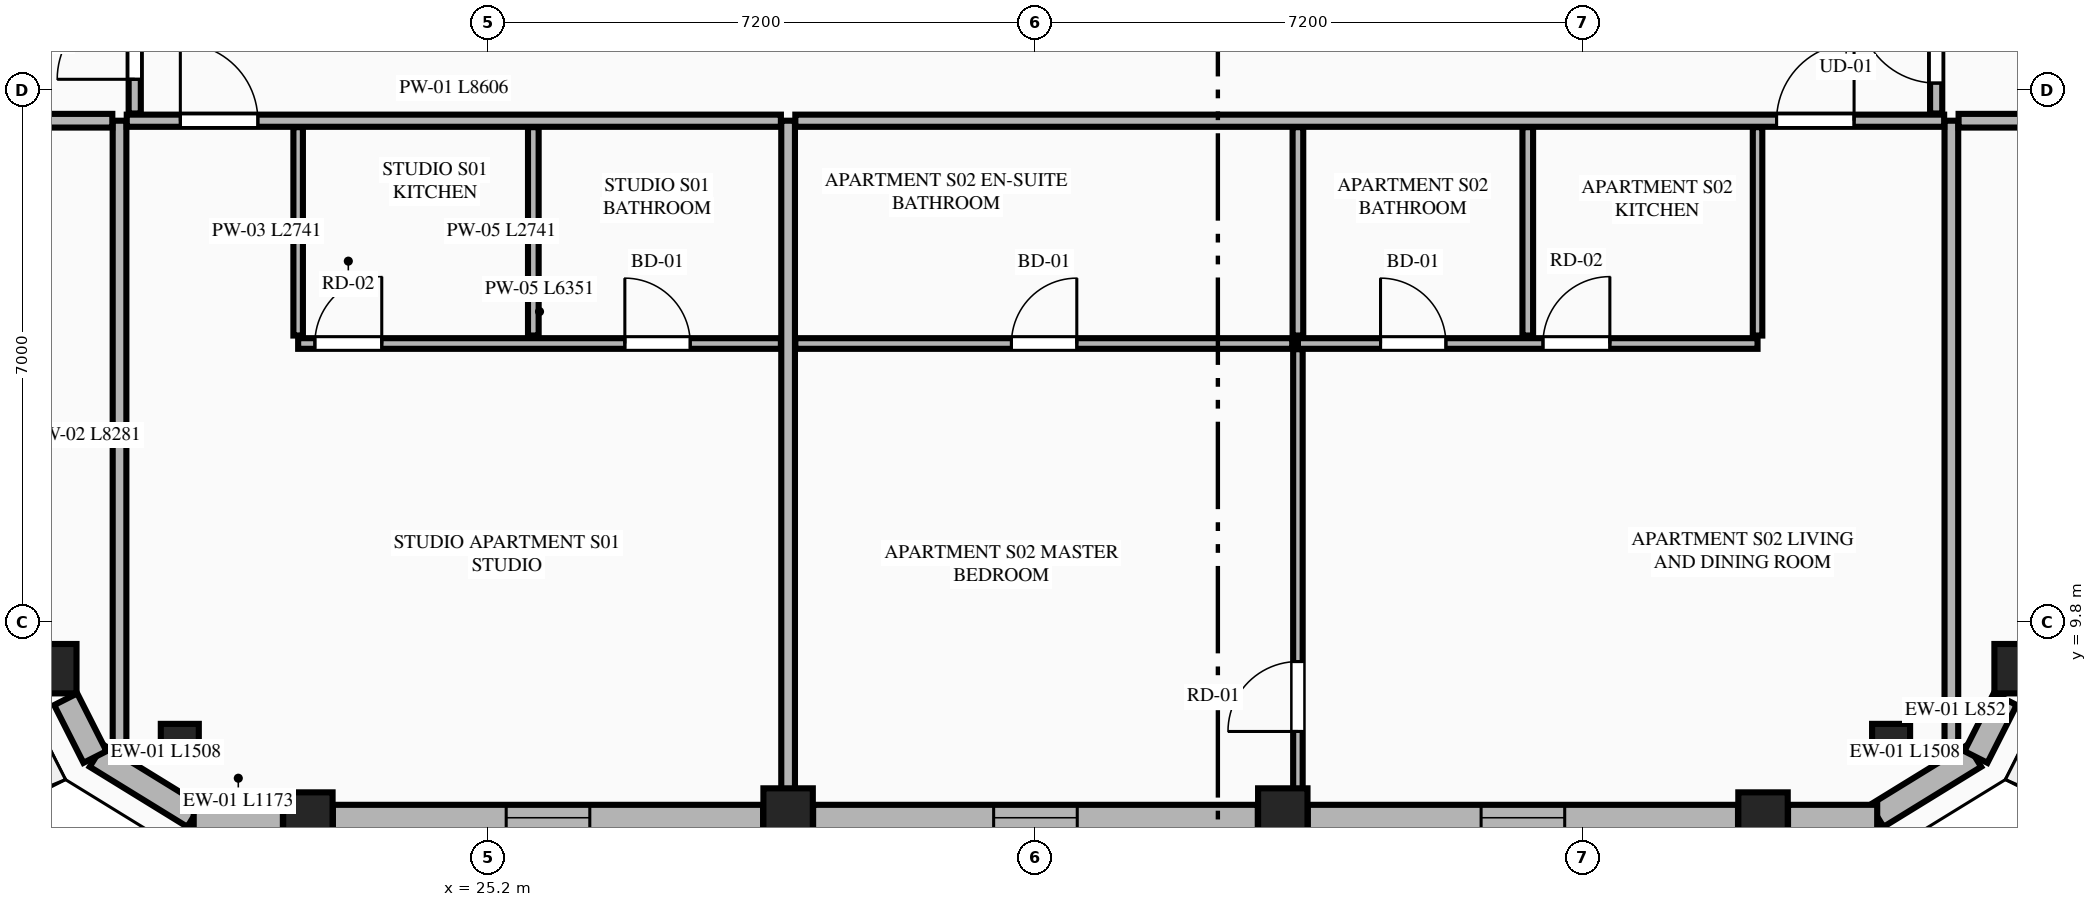
"""IFC4 building model, lengths in metres.
Left out: names, types, materials, properties, quantities, classifications, styles, units other than length and angle.
Written with IfcOpenShell. Run it as: python <this file> out.ifc"""

import sys

from ifc_helpers import new_model, si_unit, direction, frame, frame_2d, origin, origin_2d, place, context, subcontext, project, spatial, rectangle, extrude, element, fill, save


model = new_model("IFC4")
c1 = context("Model", 3, precision=1e-05, world=origin(), true_north=direction((0.0, 1.0)))
c2 = subcontext(c1, "Body", "Model", "MODEL_VIEW")
j1 = project(units=[si_unit("LENGTHUNIT", "METRE"), si_unit("PLANEANGLEUNIT", "RADIAN")], contexts=[c1])
p1 = place(None, origin())
s1 = spatial("IfcSite", under=j1, at=p1, CompositionType="ELEMENT")
p2 = place(p1, origin())
s2 = spatial("IfcBuilding", under=s1, at=p2, CompositionType="ELEMENT")
p3 = place(p2, frame((0.0, 0.0, 283.5)))
s3 = spatial("IfcBuildingStorey", under=s2, at=p3, CompositionType="ELEMENT", Elevation=283.5)
for number, where, z_axis, x_axis in (
    (1, (22.828, 7.239, 0.0), (0.0, 0.0, 1.0), (1.0, 0.0, 0.0)),
    (2, (29.146, 7.292, 0.0), (0.0, 0.0, 1.0), (1.0, 0.0, 0.0)),
    (3, (35.654, 7.292, 0.0), (0.0, 0.0, 1.0), (1.0, 0.0, 0.0)),
    (4, (41.972, 7.239, 0.0), (0.0, 0.0, 1.0), (1.0, 0.0, 0.0)),
    (5, (45.341, 9.191, 0.0), (0.0, 0.0, 1.0), (1.0, 0.0, 0.0)),
    (6, (19.459, 9.191, 0.0), (0.0, 0.0, 1.0), (1.0, 0.0, 0.0)),
):
    element("IfcColumn", number, at=place(p3, frame(where, z_axis=z_axis, x_axis=x_axis)), inside=s3, PredefinedType="COLUMN", context=c2, shape_type="SweptSolid", body=[
        extrude(rectangle(XDim=0.65, YDim=0.65, at=origin_2d()), origin(), (0.0, 0.0, 1.0), 4.0),
    ])
for number, where, z_axis, x_axis in (
    (7, (21.143, 8.215, 0.0), (0.0, 0.0, 1.0), (0.865, -0.501, 0.0)),
    (8, (43.657, 8.215, 0.0), (0.0, 0.0, 1.0), (0.865, 0.501, 0.0)),
):
    element("IfcColumn", number, at=place(p3, frame(where, z_axis=z_axis, x_axis=x_axis)), inside=s3, PredefinedType="PILASTER", context=c2, shape_type="SweptSolid", body=[
        extrude(rectangle(XDim=0.5, YDim=0.35, at=origin_2d()), origin(), (0.0, 0.0, 1.0), 4.0),
    ])
for number, where, z_axis, x_axis in (
    (9, (20.047, 8.045, 0.0), (0.0, 0.0, 1.0), (0.852, -0.524, 0.0)),
    (10, (43.469, 7.255, 0.0), (0.0, 0.0, 1.0), (0.852, 0.524, 0.0)),
):
    element("IfcWall", number, at=place(p3, frame(where, z_axis=z_axis, x_axis=x_axis)), inside=s3, PredefinedType="STANDARD", context=c2, shape_type="SweptSolid", body=[
        extrude(rectangle(XDim=1.508, YDim=0.34, at=frame_2d((0.754, 0.0))), origin(), (0.0, 0.0, 1.0), 3.8),
    ])
p4 = place(p3, frame((21.326, 7.23, 0.0), z_axis=(0.0, 0.0, 1.0), x_axis=(1.0, 0.0, 0.0)))
e11 = element("IfcWall", 11, at=p4, inside=s3, PredefinedType="STANDARD", context=c2, shape_type="SweptSolid", body=[
    extrude(rectangle(XDim=1.173, YDim=0.34, at=frame_2d((0.586, 0.0))), origin(), (0.0, 0.0, 1.0), 3.8),
])
p5 = place(p3, frame((23.157, 7.23, 0.0), z_axis=(0.0, 0.0, 1.0), x_axis=(1.0, 0.0, 0.0)))
e12 = element("IfcWall", 12, at=p5, inside=s3, PredefinedType="STANDARD", context=c2, shape_type="SweptSolid", body=[
    extrude(rectangle(XDim=5.66, YDim=0.34, at=frame_2d((2.83, 0.0))), origin(), (0.0, 0.0, 1.0), 2.99),
])
p6 = place(p5, frame((2.28, 0.0, 0.75)))
e13 = element("IfcOpeningElement", 13, at=p6, cuts=e12, PredefinedType="OPENING", context=c2, shape_type="SweptSolid", body=[
    extrude(rectangle(XDim=1.1, YDim=2.0, at=frame_2d((0.55, 1.0))), frame((0.0, 0.18, 0.0), z_axis=(0.0, -1.0, 0.0), x_axis=(1.0, 0.0, 0.0)), (0.0, 0.0, 1.0), 0.36),
])
p7 = place(p3, frame((29.475, 7.23, 0.0), z_axis=(0.0, 0.0, 1.0), x_axis=(1.0, 0.0, 0.0)))
e14 = element("IfcWall", 14, at=p7, inside=s3, PredefinedType="STANDARD", context=c2, shape_type="SweptSolid", body=[
    extrude(rectangle(XDim=5.85, YDim=0.34, at=frame_2d((2.925, 0.0))), origin(), (0.0, 0.0, 1.0), 2.99),
])
p8 = place(p7, frame((2.375, 0.0, 0.75)))
e15 = element("IfcOpeningElement", 15, at=p8, cuts=e14, PredefinedType="OPENING", context=c2, shape_type="SweptSolid", body=[
    extrude(rectangle(XDim=1.1, YDim=2.0, at=frame_2d((0.55, 1.0))), frame((0.0, 0.18, 0.0), z_axis=(0.0, -1.0, 0.0), x_axis=(1.0, 0.0, 0.0)), (0.0, 0.0, 1.0), 0.36),
])
p9 = place(p3, frame((35.983, 7.23, 0.0), z_axis=(0.0, 0.0, 1.0), x_axis=(1.0, 0.0, 0.0)))
e16 = element("IfcWall", 16, at=p9, inside=s3, PredefinedType="STANDARD", context=c2, shape_type="SweptSolid", body=[
    extrude(rectangle(XDim=5.66, YDim=0.34, at=frame_2d((2.83, 0.0))), origin(), (0.0, 0.0, 1.0), 2.99),
])
p10 = place(p9, frame((2.28, 0.0, 0.75)))
e17 = element("IfcOpeningElement", 17, at=p10, cuts=e16, PredefinedType="OPENING", context=c2, shape_type="SweptSolid", body=[
    extrude(rectangle(XDim=1.1, YDim=2.0, at=frame_2d((0.55, 1.0))), frame((0.0, 0.18, 0.0), z_axis=(0.0, -1.0, 0.0), x_axis=(1.0, 0.0, 0.0)), (0.0, 0.0, 1.0), 0.36),
])
p11 = place(p3, frame((42.301, 7.23, 0.0), z_axis=(0.0, 0.0, 1.0), x_axis=(1.0, 0.0, 0.0)))
e18 = element("IfcWall", 18, at=p11, inside=s3, PredefinedType="STANDARD", context=c2, shape_type="SweptSolid", body=[
    extrude(rectangle(XDim=1.173, YDim=0.34, at=frame_2d((0.586, 0.0))), origin(), (0.0, 0.0, 1.0), 3.8),
])
for number, where, z_axis, x_axis in (
    (19, (44.773, 8.029, 0.0), (0.0, 0.0, 1.0), (0.452, 0.892, 0.0)),
    (20, (19.642, 8.789, 0.0), (0.0, 0.0, 1.0), (0.452, -0.892, 0.0)),
):
    element("IfcWall", number, at=place(p3, frame(where, z_axis=z_axis, x_axis=x_axis)), inside=s3, PredefinedType="STANDARD", context=c2, shape_type="SweptSolid", body=[
        extrude(rectangle(XDim=0.852, YDim=0.34, at=frame_2d((0.426, 0.0))), origin(), (0.0, 0.0, 1.0), 3.8),
    ])
p12 = place(p3, frame((20.35, 8.119, 0.0), z_axis=(0.0, 0.0, 1.0), x_axis=(0.0, 1.0, 0.0)))
e21 = element("IfcWall", 21, at=p12, inside=s3, PredefinedType="PARTITIONING", context=c2, shape_type="SweptSolid", body=[
    extrude(rectangle(XDim=8.281, YDim=0.18, at=frame_2d((4.141, 0.0))), origin(), (0.0, 0.0, 1.0), 3.8),
])
p13 = place(p3, frame((29.146, 7.405, 0.0), z_axis=(0.0, 0.0, 1.0), x_axis=(0.0, 1.0, 0.0)))
e22 = element("IfcWall", 22, at=p13, inside=s3, PredefinedType="PARTITIONING", context=c2, shape_type="SweptSolid", body=[
    extrude(rectangle(XDim=8.995, YDim=0.18, at=frame_2d((4.498, 0.0))), origin(), (0.0, 0.0, 1.0), 3.257),
])
p14 = place(p3, frame((44.45, 8.119, 0.0), z_axis=(0.0, 0.0, 1.0), x_axis=(0.0, 1.0, 0.0)))
e23 = element("IfcWall", 23, at=p14, inside=s3, PredefinedType="PARTITIONING", context=c2, shape_type="SweptSolid", body=[
    extrude(rectangle(XDim=8.281, YDim=0.18, at=frame_2d((4.141, 0.0))), origin(), (0.0, 0.0, 1.0), 3.8),
])
p15 = place(p3, frame((20.445, 16.4, 0.0), z_axis=(0.0, 0.0, 1.0), x_axis=(1.0, 0.0, 0.0)))
e24 = element("IfcWall", 24, at=p15, inside=s3, PredefinedType="PARTITIONING", context=c2, shape_type="SweptSolid", body=[
    extrude(rectangle(XDim=8.606, YDim=0.16, at=frame_2d((4.303, 0.0))), origin(), (0.0, 0.0, 1.0), 3.8),
])
p16 = place(p15, frame((0.705, 0.0, 0.0)))
e25 = element("IfcOpeningElement", 25, at=p16, cuts=e24, PredefinedType="OPENING", context=c2, shape_type="SweptSolid", body=[
    extrude(rectangle(XDim=1.02, YDim=2.25, at=frame_2d((0.51, 1.125))), frame((0.0, 0.09, 0.0), z_axis=(0.0, -1.0, 0.0), x_axis=(1.0, 0.0, 0.0)), (0.0, 0.0, 1.0), 0.18),
])
p17 = place(p3, frame((22.7, 13.574, 0.0), z_axis=(0.0, 0.0, 1.0), x_axis=(0.0, 1.0, 0.0)))
e26 = element("IfcWall", 26, at=p17, inside=s3, PredefinedType="PARTITIONING", context=c2, shape_type="SweptSolid", body=[
    extrude(rectangle(XDim=2.741, YDim=0.125, at=frame_2d((1.371, 0.0))), origin(), (0.0, 0.0, 1.0), 3.257),
])
p18 = place(p3, frame((22.7, 13.469, 0.0), z_axis=(0.0, 0.0, 1.0), x_axis=(1.0, 0.0, 0.0)))
e27 = element("IfcWall", 27, at=p18, inside=s3, PredefinedType="PLUMBINGWALL", context=c2, shape_type="SweptSolid", body=[
    extrude(rectangle(XDim=6.351, YDim=0.14, at=frame_2d((3.176, 0.0))), origin(), (0.0, 0.0, 1.0), 3.8),
])
p19 = place(p18, frame((4.298, 0.0, 0.0)))
e28 = element("IfcOpeningElement", 28, at=p19, cuts=e27, PredefinedType="OPENING", context=c2, shape_type="SweptSolid", body=[
    extrude(rectangle(XDim=0.86, YDim=2.1, at=frame_2d((0.43, 1.05))), frame((0.0, 0.08, 0.0), z_axis=(0.0, -1.0, 0.0), x_axis=(1.0, 0.0, 0.0)), (0.0, 0.0, 1.0), 0.16),
])
p20 = place(p18, frame((0.22, 0.0, 0.0)))
e29 = element("IfcOpeningElement", 29, at=p20, cuts=e27, PredefinedType="OPENING", context=c2, shape_type="SweptSolid", body=[
    extrude(rectangle(XDim=0.88, YDim=2.15, at=frame_2d((0.44, 1.075))), frame((0.0, 0.08, 0.0), z_axis=(0.0, -1.0, 0.0), x_axis=(1.0, 0.0, 0.0)), (0.0, 0.0, 1.0), 0.16),
])
p21 = place(p3, frame((25.794, 13.574, 0.0), z_axis=(0.0, 0.0, 1.0), x_axis=(0.0, 1.0, 0.0)))
e30 = element("IfcWall", 30, at=p21, inside=s3, PredefinedType="PLUMBINGWALL", context=c2, shape_type="SweptSolid", body=[
    extrude(rectangle(XDim=2.741, YDim=0.14, at=frame_2d((1.371, 0.0))), origin(), (0.0, 0.0, 1.0), 3.8),
])
p22 = place(p3, frame((29.241, 16.4, 0.0), z_axis=(0.0, 0.0, 1.0), x_axis=(1.0, 0.0, 0.0)))
e31 = element("IfcWall", 31, at=p22, inside=s3, PredefinedType="PARTITIONING", context=c2, shape_type="SweptSolid", body=[
    extrude(rectangle(XDim=15.114, YDim=0.16, at=frame_2d((7.557, 0.0))), origin(), (0.0, 0.0, 1.0), 3.8),
])
p23 = place(p22, frame((12.909, 0.0, 0.0)))
e32 = element("IfcOpeningElement", 32, at=p23, cuts=e31, PredefinedType="OPENING", context=c2, shape_type="SweptSolid", body=[
    extrude(rectangle(XDim=1.02, YDim=2.25, at=frame_2d((0.51, 1.125))), frame((0.0, 0.09, 0.0), z_axis=(0.0, -1.0, 0.0), x_axis=(1.0, 0.0, 0.0)), (0.0, 0.0, 1.0), 0.18),
])
p24 = place(p3, frame((41.9, 13.574, 0.0), z_axis=(0.0, 0.0, 1.0), x_axis=(0.0, 1.0, 0.0)))
e33 = element("IfcWall", 33, at=p24, inside=s3, PredefinedType="PARTITIONING", context=c2, shape_type="SweptSolid", body=[
    extrude(rectangle(XDim=2.741, YDim=0.125, at=frame_2d((1.371, 0.0))), origin(), (0.0, 0.0, 1.0), 3.257),
])
p25 = place(p3, frame((35.853, 13.469, 0.0), z_axis=(0.0, 0.0, 1.0), x_axis=(1.0, 0.0, 0.0)))
e34 = element("IfcWall", 34, at=p25, inside=s3, PredefinedType="PLUMBINGWALL", context=c2, shape_type="SweptSolid", body=[
    extrude(rectangle(XDim=6.047, YDim=0.14, at=frame_2d((3.023, 0.0))), origin(), (0.0, 0.0, 1.0), 3.8),
])
p26 = place(p25, frame((1.087, 0.0, 0.0)))
e35 = element("IfcOpeningElement", 35, at=p26, cuts=e34, PredefinedType="OPENING", context=c2, shape_type="SweptSolid", body=[
    extrude(rectangle(XDim=0.86, YDim=2.1, at=frame_2d((0.43, 1.05))), frame((0.0, 0.08, 0.0), z_axis=(0.0, -1.0, 0.0), x_axis=(1.0, 0.0, 0.0)), (0.0, 0.0, 1.0), 0.16),
])
p27 = place(p25, frame((3.224, 0.0, 0.0)))
e36 = element("IfcOpeningElement", 36, at=p27, cuts=e34, PredefinedType="OPENING", context=c2, shape_type="SweptSolid", body=[
    extrude(rectangle(XDim=0.88, YDim=2.15, at=frame_2d((0.44, 1.075))), frame((0.0, 0.08, 0.0), z_axis=(0.0, -1.0, 0.0), x_axis=(1.0, 0.0, 0.0)), (0.0, 0.0, 1.0), 0.16),
])
p28 = place(p3, frame((29.241, 13.469, 0.0), z_axis=(0.0, 0.0, 1.0), x_axis=(1.0, 0.0, 0.0)))
e37 = element("IfcWall", 37, at=p28, inside=s3, PredefinedType="PLUMBINGWALL", context=c2, shape_type="SweptSolid", body=[
    extrude(rectangle(XDim=6.537, YDim=0.14, at=frame_2d((3.269, 0.0))), origin(), (0.0, 0.0, 1.0), 3.8),
])
p29 = place(p28, frame((2.843, 0.0, 0.0)))
e38 = element("IfcOpeningElement", 38, at=p29, cuts=e37, PredefinedType="OPENING", context=c2, shape_type="SweptSolid", body=[
    extrude(rectangle(XDim=0.86, YDim=2.1, at=frame_2d((0.43, 1.05))), frame((0.0, 0.08, 0.0), z_axis=(0.0, -1.0, 0.0), x_axis=(1.0, 0.0, 0.0)), (0.0, 0.0, 1.0), 0.16),
])
for number, where, z_axis, x_axis in (
    (39, (38.877, 13.574, 0.0), (0.0, 0.0, 1.0), (0.0, 1.0, 0.0)),
    (40, (35.853, 13.574, 0.0), (0.0, 0.0, 1.0), (0.0, 1.0, 0.0)),
):
    element("IfcWall", number, at=place(p3, frame(where, z_axis=z_axis, x_axis=x_axis)), inside=s3, PredefinedType="PLUMBINGWALL", context=c2, shape_type="SweptSolid", body=[
        extrude(rectangle(XDim=2.741, YDim=0.14, at=frame_2d((1.371, 0.0))), origin(), (0.0, 0.0, 1.0), 3.8),
    ])
p30 = place(p3, frame((35.853, 7.315, 0.0), z_axis=(0.0, 0.0, 1.0), x_axis=(0.0, 1.0, 0.0)))
e41 = element("IfcWall", 41, at=p30, inside=s3, PredefinedType="PARTITIONING", context=c2, shape_type="SweptSolid", body=[
    extrude(rectangle(XDim=6.079, YDim=0.125, at=frame_2d((3.04, 0.0))), origin(), (0.0, 0.0, 1.0), 3.8),
])
p31 = place(p30, frame((1.05, 0.0, 0.0)))
e42 = element("IfcOpeningElement", 42, at=p31, cuts=e41, PredefinedType="OPENING", context=c2, shape_type="SweptSolid", body=[
    extrude(rectangle(XDim=0.92, YDim=2.15, at=frame_2d((0.46, 1.075))), frame((0.0, 0.073, 0.0), z_axis=(0.0, -1.0, 0.0), x_axis=(1.0, 0.0, 0.0)), (0.0, 0.0, 1.0), 0.145),
])
p32 = place(p3, frame((16.034, 16.4, 0.0), z_axis=(0.0, 0.0, 1.0), x_axis=(1.0, 0.0, 0.0)))
e43 = element("IfcWall", 43, at=p32, inside=s3, PredefinedType="PARTITIONING", context=c2, shape_type="SweptSolid", body=[
    extrude(rectangle(XDim=4.221, YDim=0.18, at=frame_2d((2.11, 0.0))), origin(), (0.0, 0.0, 1.0), 3.8),
])
p33 = place(p3, frame((44.545, 16.4, 0.0), z_axis=(0.0, 0.0, 1.0), x_axis=(1.0, 0.0, 0.0)))
e44 = element("IfcWall", 44, at=p33, inside=s3, PredefinedType="PARTITIONING", context=c2, shape_type="SweptSolid", body=[
    extrude(rectangle(XDim=4.221, YDim=0.18, at=frame_2d((2.111, 0.0))), origin(), (0.0, 0.0, 1.0), 3.8),
])
p34 = place(p3, frame((20.55, 16.495, 0.0), z_axis=(0.0, 0.0, 1.0), x_axis=(0.0, 1.0, 0.0)))
e45 = element("IfcWall", 45, at=p34, inside=s3, PredefinedType="PARTITIONING", context=c2, shape_type="SweptSolid", body=[
    extrude(rectangle(XDim=9.11, YDim=0.16, at=frame_2d((4.555, 0.0))), origin(), (0.0, 0.0, 1.0), 3.487),
])
p35 = place(p34, frame((0.45, 0.0, 0.0)))
e46 = element("IfcOpeningElement", 46, at=p35, cuts=e45, PredefinedType="OPENING", context=c2, shape_type="SweptSolid", body=[
    extrude(rectangle(XDim=1.02, YDim=2.25, at=frame_2d((0.51, 1.125))), frame((0.0, 0.09, 0.0), z_axis=(0.0, -1.0, 0.0), x_axis=(1.0, 0.0, 0.0)), (0.0, 0.0, 1.0), 0.18),
])
p36 = place(p3, frame((44.25, 16.495, 0.0), z_axis=(0.0, 0.0, 1.0), x_axis=(0.0, 1.0, 0.0)))
e47 = element("IfcWall", 47, at=p36, inside=s3, PredefinedType="PARTITIONING", context=c2, shape_type="SweptSolid", body=[
    extrude(rectangle(XDim=18.41, YDim=0.16, at=frame_2d((9.205, 0.0))), origin(), (0.0, 0.0, 1.0), 3.487),
])
p37 = place(p36, frame((0.4, 0.0, 0.0)))
e48 = element("IfcOpeningElement", 48, at=p37, cuts=e47, PredefinedType="OPENING", context=c2, shape_type="SweptSolid", body=[
    extrude(rectangle(XDim=1.02, YDim=2.25, at=frame_2d((0.51, 1.125))), frame((0.0, 0.09, 0.0), z_axis=(0.0, -1.0, 0.0), x_axis=(1.0, 0.0, 0.0)), (0.0, 0.0, 1.0), 0.18),
])
p38 = place(p6, origin())
e49 = element("IfcWindow", 49, at=p38, inside=s3, PartitioningType="SINGLE_PANEL", PredefinedType="WINDOW", context=c2, shape_type="SweptSolid", body=[
    extrude(rectangle(XDim=1.1, YDim=2.0, at=frame_2d((0.55, 1.0))), frame((0.0, 0.03, 0.0), z_axis=(0.0, -1.0, 0.0), x_axis=(1.0, 0.0, 0.0)), (0.0, 0.0, 1.0), 0.06),
])
fill(e13, e49)
p39 = place(p8, origin())
e50 = element("IfcWindow", 50, at=p39, inside=s3, PartitioningType="SINGLE_PANEL", PredefinedType="WINDOW", context=c2, shape_type="SweptSolid", body=[
    extrude(rectangle(XDim=1.1, YDim=2.0, at=frame_2d((0.55, 1.0))), frame((0.0, 0.03, 0.0), z_axis=(0.0, -1.0, 0.0), x_axis=(1.0, 0.0, 0.0)), (0.0, 0.0, 1.0), 0.06),
])
fill(e15, e50)
p40 = place(p10, origin())
e51 = element("IfcWindow", 51, at=p40, inside=s3, PartitioningType="SINGLE_PANEL", PredefinedType="WINDOW", context=c2, shape_type="SweptSolid", body=[
    extrude(rectangle(XDim=1.1, YDim=2.0, at=frame_2d((0.55, 1.0))), frame((0.0, 0.03, 0.0), z_axis=(0.0, -1.0, 0.0), x_axis=(1.0, 0.0, 0.0)), (0.0, 0.0, 1.0), 0.06),
])
fill(e17, e51)
p41 = place(p19, origin())
e52 = element("IfcDoor", 52, at=p41, inside=s3, OperationType="SINGLE_SWING_LEFT", PredefinedType="DOOR", context=c2, shape_type="SweptSolid", body=[
    extrude(rectangle(XDim=0.86, YDim=2.1, at=frame_2d((0.43, 1.05))), frame((0.0, 0.025, 0.0), z_axis=(0.0, -1.0, 0.0), x_axis=(1.0, 0.0, 0.0)), (0.0, 0.0, 1.0), 0.05),
])
fill(e28, e52)
p42 = place(p16, origin())
e53 = element("IfcDoor", 53, at=p42, inside=s3, OperationType="SINGLE_SWING_LEFT", PredefinedType="DOOR", context=c2, shape_type="SweptSolid", body=[
    extrude(rectangle(XDim=1.02, YDim=2.25, at=frame_2d((0.51, 1.125))), frame((0.0, 0.025, 0.0), z_axis=(0.0, -1.0, 0.0), x_axis=(1.0, 0.0, 0.0)), (0.0, 0.0, 1.0), 0.05),
])
fill(e25, e53)
p43 = place(p20, origin())
e54 = element("IfcDoor", 54, at=p43, inside=s3, OperationType="SINGLE_SWING_RIGHT", PredefinedType="DOOR", context=c2, shape_type="SweptSolid", body=[
    extrude(rectangle(XDim=0.88, YDim=2.15, at=frame_2d((0.44, 1.075))), frame((0.0, 0.025, 0.0), z_axis=(0.0, -1.0, 0.0), x_axis=(1.0, 0.0, 0.0)), (0.0, 0.0, 1.0), 0.05),
])
fill(e29, e54)
p44 = place(p26, origin())
e55 = element("IfcDoor", 55, at=p44, inside=s3, OperationType="SINGLE_SWING_LEFT", PredefinedType="DOOR", context=c2, shape_type="SweptSolid", body=[
    extrude(rectangle(XDim=0.86, YDim=2.1, at=frame_2d((0.43, 1.05))), frame((0.0, 0.025, 0.0), z_axis=(0.0, -1.0, 0.0), x_axis=(1.0, 0.0, 0.0)), (0.0, 0.0, 1.0), 0.05),
])
fill(e35, e55)
p45 = place(p29, origin())
e56 = element("IfcDoor", 56, at=p45, inside=s3, OperationType="SINGLE_SWING_RIGHT", PredefinedType="DOOR", context=c2, shape_type="SweptSolid", body=[
    extrude(rectangle(XDim=0.86, YDim=2.1, at=frame_2d((0.43, 1.05))), frame((0.0, 0.025, 0.0), z_axis=(0.0, -1.0, 0.0), x_axis=(1.0, 0.0, 0.0)), (0.0, 0.0, 1.0), 0.05),
])
fill(e38, e56)
p46 = place(p23, origin())
e57 = element("IfcDoor", 57, at=p46, inside=s3, OperationType="SINGLE_SWING_RIGHT", PredefinedType="DOOR", context=c2, shape_type="SweptSolid", body=[
    extrude(rectangle(XDim=1.02, YDim=2.25, at=frame_2d((0.51, 1.125))), frame((0.0, 0.025, 0.0), z_axis=(0.0, -1.0, 0.0), x_axis=(1.0, 0.0, 0.0)), (0.0, 0.0, 1.0), 0.05),
])
fill(e32, e57)
p47 = place(p27, origin())
e58 = element("IfcDoor", 58, at=p47, inside=s3, OperationType="SINGLE_SWING_RIGHT", PredefinedType="DOOR", context=c2, shape_type="SweptSolid", body=[
    extrude(rectangle(XDim=0.88, YDim=2.15, at=frame_2d((0.44, 1.075))), frame((0.0, 0.025, 0.0), z_axis=(0.0, -1.0, 0.0), x_axis=(1.0, 0.0, 0.0)), (0.0, 0.0, 1.0), 0.05),
])
fill(e36, e58)
p48 = place(p31, origin())
e59 = element("IfcDoor", 59, at=p48, inside=s3, OperationType="SINGLE_SWING_LEFT", PredefinedType="DOOR", context=c2, shape_type="SweptSolid", body=[
    extrude(rectangle(XDim=0.92, YDim=2.15, at=frame_2d((0.46, 1.075))), frame((0.0, 0.025, 0.0), z_axis=(0.0, -1.0, 0.0), x_axis=(1.0, 0.0, 0.0)), (0.0, 0.0, 1.0), 0.05),
])
fill(e42, e59)
p49 = place(p35, origin())
e60 = element("IfcDoor", 60, at=p49, inside=s3, OperationType="SINGLE_SWING_LEFT", PredefinedType="DOOR", context=c2, shape_type="SweptSolid", body=[
    extrude(rectangle(XDim=1.02, YDim=2.25, at=frame_2d((0.51, 1.125))), frame((0.0, 0.025, 0.0), z_axis=(0.0, -1.0, 0.0), x_axis=(1.0, 0.0, 0.0)), (0.0, 0.0, 1.0), 0.05),
])
fill(e46, e60)
p50 = place(p37, origin())
e61 = element("IfcDoor", 61, at=p50, inside=s3, OperationType="SINGLE_SWING_RIGHT", PredefinedType="DOOR", context=c2, shape_type="SweptSolid", body=[
    extrude(rectangle(XDim=1.02, YDim=2.25, at=frame_2d((0.51, 1.125))), frame((0.0, 0.025, 0.0), z_axis=(0.0, -1.0, 0.0), x_axis=(1.0, 0.0, 0.0)), (0.0, 0.0, 1.0), 0.05),
])
fill(e48, e61)
save(model, sys.argv[1])
